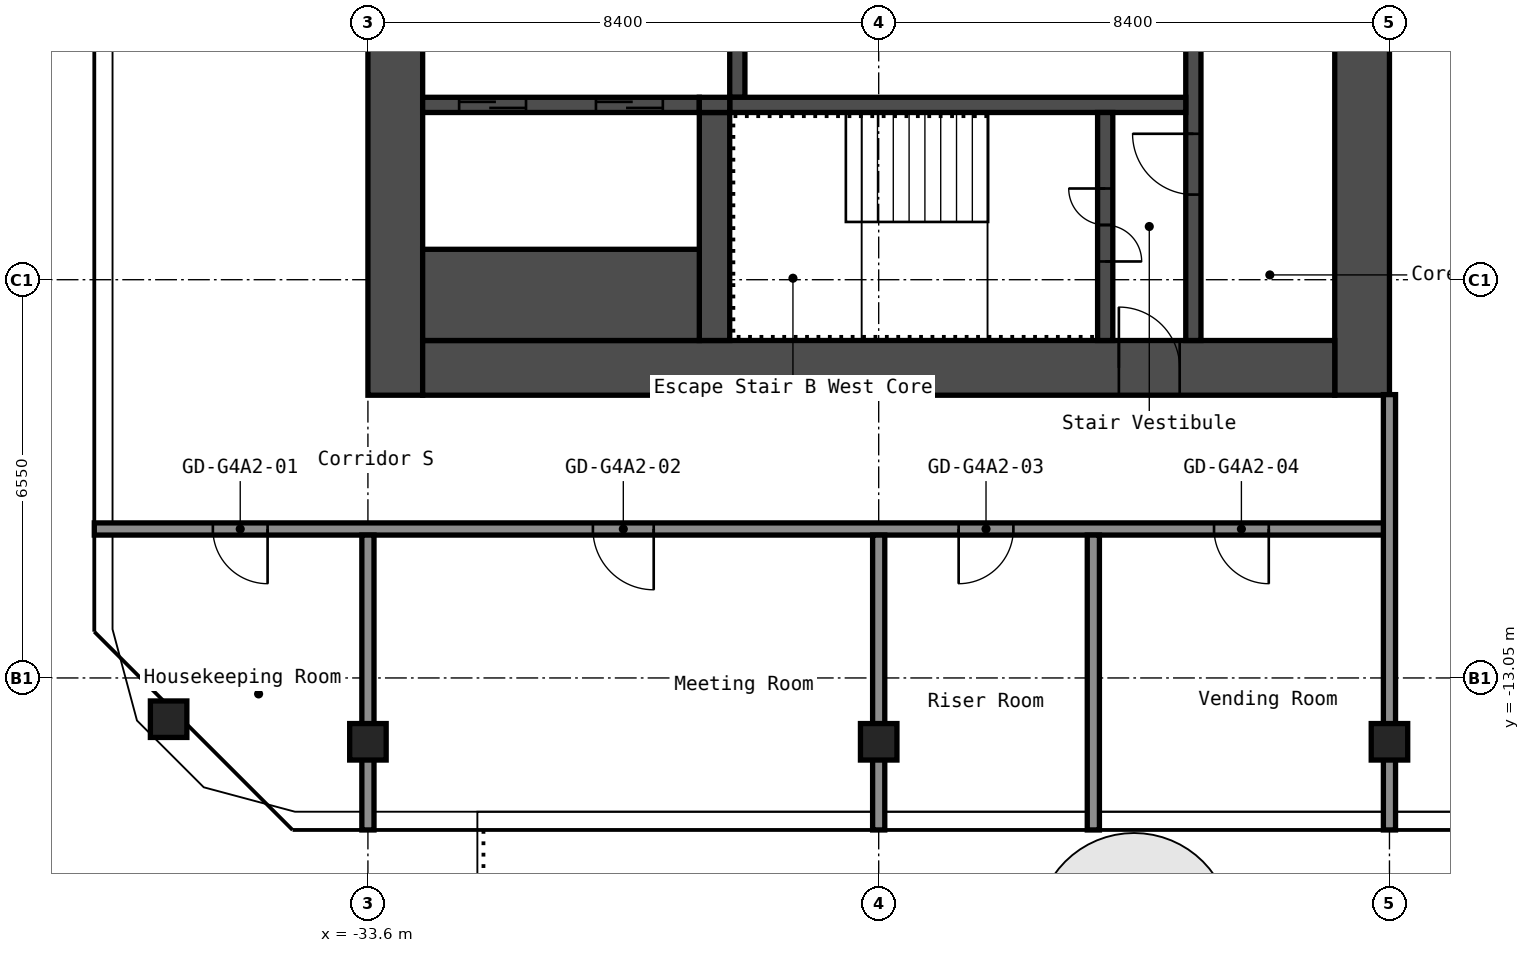
"""IFC4 building model, lengths in metres.
Left out: names, types, materials, properties, quantities, classifications, styles, units other than length and angle.
Written with IfcOpenShell. Run it as: python <this file> out.ifc"""

import sys

from ifc_helpers import new_model, si_unit, direction, frame, frame_2d, origin, origin_2d, place, context, subcontext, project, spatial, rectangle, hollow_rectangle, extrude, element, fill, save


model = new_model("IFC4")
c1 = context("Model", 3, precision=1e-05, world=origin(), true_north=direction((0.0, 1.0)))
c2 = subcontext(c1, "Body", "Model", "MODEL_VIEW")
j1 = project(units=[si_unit("LENGTHUNIT", "METRE"), si_unit("PLANEANGLEUNIT", "RADIAN")], contexts=[c1])
p1 = place(None, origin())
s1 = spatial("IfcSite", under=j1, at=p1, CompositionType="ELEMENT")
p2 = place(p1, origin())
s2 = spatial("IfcBuilding", under=s1, at=p2, CompositionType="ELEMENT")
p3 = place(p2, frame((0.0, 0.0, 218.6)))
s3 = spatial("IfcBuildingStorey", under=s2, at=p3, CompositionType="ELEMENT", Elevation=218.6)
for number, where, z_axis, x_axis in (
    (1, (-36.878, -13.729, 0.0), (0.0, 0.0, 1.0), (1.0, 0.0, 0.0)),
    (2, (-33.6, -14.1, 0.0), (0.0, 0.0, 1.0), (1.0, 0.0, 0.0)),
    (3, (-25.2, -14.1, 0.0), (0.0, 0.0, 1.0), (1.0, 0.0, 0.0)),
    (4, (-16.8, -14.1, 0.0), (0.0, 0.0, 1.0), (1.0, 0.0, 0.0)),
):
    element("IfcColumn", number, at=place(p3, frame(where, z_axis=z_axis, x_axis=x_axis)), inside=s3, PredefinedType="COLUMN", context=c2, shape_type="SweptSolid", body=[
        extrude(hollow_rectangle(XDim=0.6, YDim=0.6, WallThickness=0.025, InnerFilletRadius=0.038, OuterFilletRadius=0.062, at=origin_2d()), origin(), (0.0, 0.0, 1.0), 2.75),
    ])
p4 = place(p3, frame((-17.25, -8.4, 0.0), z_axis=(0.0, 0.0, 1.0), x_axis=(0.0, 1.0, 0.0)))
e5 = element("IfcWall", 5, at=p4, inside=s3, PredefinedType="SHEAR", context=c2, shape_type="SweptSolid", body=[
    extrude(rectangle(XDim=16.8, YDim=0.9, at=frame_2d((8.4, 0.0))), origin(), (0.0, 0.0, 1.0), 2.75),
])
p5 = place(p4, frame((10.1, 0.0, 0.0)))
e6 = element("IfcOpeningElement", 6, at=p5, cuts=e5, PredefinedType="OPENING", context=c2, shape_type="SweptSolid", body=[
    extrude(rectangle(XDim=1.6, YDim=2.1, at=frame_2d((0.8, 1.05))), frame((0.0, 0.46, 0.0), z_axis=(0.0, -1.0, 0.0), x_axis=(1.0, 0.0, 0.0)), (0.0, 0.0, 1.0), 0.92),
])
p6 = place(p3, frame((-33.15, -8.4, 0.0), z_axis=(0.0, 0.0, 1.0), x_axis=(0.0, 1.0, 0.0)))
e7 = element("IfcWall", 7, at=p6, inside=s3, PredefinedType="SHEAR", context=c2, shape_type="SweptSolid", body=[
    extrude(rectangle(XDim=16.8, YDim=0.9, at=frame_2d((8.4, 0.0))), origin(), (0.0, 0.0, 1.0), 2.75),
])
p7 = place(p3, frame((-32.7, -7.95, 0.0), z_axis=(0.0, 0.0, 1.0), x_axis=(1.0, 0.0, 0.0)))
e8 = element("IfcWall", 8, at=p7, inside=s3, PredefinedType="SHEAR", context=c2, shape_type="SweptSolid", body=[
    extrude(rectangle(XDim=15.0, YDim=0.9, at=frame_2d((7.5, 0.0))), origin(), (0.0, 0.0, 1.0), 2.75),
])
p8 = place(p7, frame((11.45, 0.0, 0.0)))
e9 = element("IfcOpeningElement", 9, at=p8, cuts=e8, PredefinedType="OPENING", context=c2, shape_type="SweptSolid", body=[
    extrude(rectangle(XDim=1.0, YDim=2.1, at=frame_2d((0.5, 1.05))), frame((0.0, 0.46, 0.0), z_axis=(0.0, -1.0, 0.0), x_axis=(1.0, 0.0, 0.0)), (0.0, 0.0, 1.0), 0.92),
])
p9 = place(p3, frame((-20.025, -7.5, 0.0), z_axis=(0.0, 0.0, 1.0), x_axis=(0.0, 1.0, 0.0)))
e10 = element("IfcWall", 10, at=p9, inside=s3, PredefinedType="SHEAR", context=c2, shape_type="SweptSolid", body=[
    extrude(rectangle(XDim=6.3, YDim=0.25, at=frame_2d((3.15, 0.0))), origin(), (0.0, 0.0, 1.0), 2.75),
])
p10 = place(p9, frame((2.4, 0.0, 0.0)))
e11 = element("IfcOpeningElement", 11, at=p10, cuts=e10, PredefinedType="OPENING", context=c2, shape_type="SweptSolid", body=[
    extrude(rectangle(XDim=1.0, YDim=2.1, at=frame_2d((0.5, 1.05))), frame((0.0, 0.135, 0.0), z_axis=(0.0, -1.0, 0.0), x_axis=(1.0, 0.0, 0.0)), (0.0, 0.0, 1.0), 0.27),
])
p11 = place(p3, frame((-27.525, -3.5, 0.0), z_axis=(0.0, 0.0, 1.0), x_axis=(0.0, 1.0, 0.0)))
e12 = element("IfcWall", 12, at=p11, inside=s3, PredefinedType="SHEAR", context=c2, shape_type="SweptSolid", body=[
    extrude(rectangle(XDim=2.05, YDim=0.25, at=frame_2d((1.025, 0.0))), origin(), (0.0, 0.0, 1.0), 2.75),
])
p12 = place(p3, frame((-27.65, -3.625, 0.0), z_axis=(0.0, 0.0, 1.0), x_axis=(1.0, 0.0, 0.0)))
e13 = element("IfcWall", 13, at=p12, inside=s3, PredefinedType="SHEAR", context=c2, shape_type="SweptSolid", body=[
    extrude(rectangle(XDim=7.5, YDim=0.25, at=frame_2d((3.75, 0.0))), origin(), (0.0, 0.0, 1.0), 2.75),
])
p13 = place(p3, frame((-21.475, -7.5, 0.0), z_axis=(0.0, 0.0, 1.0), x_axis=(0.0, 1.0, 0.0)))
e14 = element("IfcWall", 14, at=p13, inside=s3, PredefinedType="SHEAR", context=c2, shape_type="SweptSolid", body=[
    extrude(rectangle(XDim=3.75, YDim=0.25, at=frame_2d((1.875, 0.0))), origin(), (0.0, 0.0, 1.0), 2.75),
])
p14 = place(p13, frame((1.3, 0.0, 0.0)))
e15 = element("IfcOpeningElement", 15, at=p14, cuts=e14, PredefinedType="OPENING", context=c2, shape_type="SweptSolid", body=[
    extrude(rectangle(XDim=1.2, YDim=2.1, at=frame_2d((0.6, 1.05))), frame((0.0, 0.135, 0.0), z_axis=(0.0, -1.0, 0.0), x_axis=(1.0, 0.0, 0.0)), (0.0, 0.0, 1.0), 0.27),
])
p15 = place(p3, frame((-27.9, -7.5, 0.0), z_axis=(0.0, 0.0, 1.0), x_axis=(0.0, 1.0, 0.0)))
e16 = element("IfcWall", 16, at=p15, inside=s3, PredefinedType="SHEAR", context=c2, shape_type="SweptSolid", body=[
    extrude(rectangle(XDim=3.75, YDim=0.5, at=frame_2d((1.875, 0.0))), origin(), (0.0, 0.0, 1.0), 2.75),
])
p16 = place(p3, frame((-32.7, -3.625, 0.0), z_axis=(0.0, 0.0, 1.0), x_axis=(1.0, 0.0, 0.0)))
e17 = element("IfcWall", 17, at=p16, inside=s3, PredefinedType="SHEAR", context=c2, shape_type="SweptSolid", body=[
    extrude(rectangle(XDim=4.55, YDim=0.25, at=frame_2d((2.275, 0.0))), origin(), (0.0, 0.0, 1.0), 2.75),
])
p17 = place(p16, frame((2.85, 0.0, 0.0)))
e18 = element("IfcOpeningElement", 18, at=p17, cuts=e17, PredefinedType="OPENING", context=c2, shape_type="SweptSolid", body=[
    extrude(rectangle(XDim=1.1, YDim=2.1, at=frame_2d((0.55, 1.05))), frame((0.0, 0.135, 0.0), z_axis=(0.0, -1.0, 0.0), x_axis=(1.0, 0.0, 0.0)), (0.0, 0.0, 1.0), 0.27),
])
p18 = place(p16, frame((0.6, 0.0, 0.0)))
e19 = element("IfcOpeningElement", 19, at=p18, cuts=e17, PredefinedType="OPENING", context=c2, shape_type="SweptSolid", body=[
    extrude(rectangle(XDim=1.1, YDim=2.1, at=frame_2d((0.55, 1.05))), frame((0.0, 0.135, 0.0), z_axis=(0.0, -1.0, 0.0), x_axis=(1.0, 0.0, 0.0)), (0.0, 0.0, 1.0), 0.27),
])
p19 = place(p3, frame((-32.7, -6.75, 0.0), z_axis=(0.0, 0.0, 1.0), x_axis=(1.0, 0.0, 0.0)))
e20 = element("IfcWall", 20, at=p19, inside=s3, PredefinedType="SHEAR", context=c2, shape_type="SweptSolid", body=[
    extrude(rectangle(XDim=4.55, YDim=1.5, at=frame_2d((2.275, 0.0))), origin(), (0.0, 0.0, 1.0), 2.75),
])
p20 = place(p3, frame((-28.15, -3.625, 0.0), z_axis=(0.0, 0.0, 1.0), x_axis=(1.0, 0.0, 0.0)))
e21 = element("IfcWall", 21, at=p20, inside=s3, PredefinedType="SHEAR", context=c2, shape_type="SweptSolid", body=[
    extrude(rectangle(XDim=0.5, YDim=0.25, at=frame_2d((0.25, 0.0))), origin(), (0.0, 0.0, 1.0), 2.75),
])
p21 = place(p3, frame((-38.1, -10.6, 0.0), z_axis=(0.0, 0.0, 1.0), x_axis=(1.0, 0.0, 0.0)))
e22 = element("IfcWall", 22, at=p21, inside=s3, PredefinedType="PARTITIONING", context=c2, shape_type="SweptSolid", body=[
    extrude(rectangle(XDim=21.3, YDim=0.2, at=frame_2d((10.65, 0.0))), origin(), (0.0, 0.0, 1.0), 2.75),
])
p22 = place(p21, frame((1.95, 0.0, 0.0)))
e23 = element("IfcOpeningElement", 23, at=p22, cuts=e22, PredefinedType="OPENING", context=c2, shape_type="SweptSolid", body=[
    extrude(rectangle(XDim=0.9, YDim=2.1, at=frame_2d((0.45, 1.05))), frame((0.0, 0.11, 0.0), z_axis=(0.0, -1.0, 0.0), x_axis=(1.0, 0.0, 0.0)), (0.0, 0.0, 1.0), 0.22),
])
p23 = place(p21, frame((8.2, 0.0, 0.0)))
e24 = element("IfcOpeningElement", 24, at=p23, cuts=e22, PredefinedType="OPENING", context=c2, shape_type="SweptSolid", body=[
    extrude(rectangle(XDim=1.0, YDim=2.1, at=frame_2d((0.5, 1.05))), frame((0.0, 0.11, 0.0), z_axis=(0.0, -1.0, 0.0), x_axis=(1.0, 0.0, 0.0)), (0.0, 0.0, 1.0), 0.22),
])
p24 = place(p21, frame((14.215, 0.0, 0.0)))
e25 = element("IfcOpeningElement", 25, at=p24, cuts=e22, PredefinedType="OPENING", context=c2, shape_type="SweptSolid", body=[
    extrude(rectangle(XDim=0.9, YDim=2.1, at=frame_2d((0.45, 1.05))), frame((0.0, 0.11, 0.0), z_axis=(0.0, -1.0, 0.0), x_axis=(1.0, 0.0, 0.0)), (0.0, 0.0, 1.0), 0.22),
])
p25 = place(p21, frame((18.415, 0.0, 0.0)))
e26 = element("IfcOpeningElement", 26, at=p25, cuts=e22, PredefinedType="OPENING", context=c2, shape_type="SweptSolid", body=[
    extrude(rectangle(XDim=0.9, YDim=2.1, at=frame_2d((0.45, 1.05))), frame((0.0, 0.11, 0.0), z_axis=(0.0, -1.0, 0.0), x_axis=(1.0, 0.0, 0.0)), (0.0, 0.0, 1.0), 0.22),
])
for number, where, z_axis, x_axis in (
    (27, (-33.6, -15.55, 0.0), (0.0, 0.0, 1.0), (0.0, 1.0, 0.0)),
    (28, (-25.2, -15.55, 0.0), (0.0, 0.0, 1.0), (0.0, 1.0, 0.0)),
    (29, (-21.67, -15.55, 0.0), (0.0, 0.0, 1.0), (0.0, 1.0, 0.0)),
):
    element("IfcWall", number, at=place(p3, frame(where, z_axis=z_axis, x_axis=x_axis)), inside=s3, PredefinedType="PARTITIONING", context=c2, shape_type="SweptSolid", body=[
        extrude(rectangle(XDim=4.85, YDim=0.2, at=frame_2d((2.425, 0.0))), origin(), (0.0, 0.0, 1.0), 2.75),
    ])
p26 = place(p3, frame((-16.8, -15.55, 0.0), z_axis=(0.0, 0.0, 1.0), x_axis=(0.0, 1.0, 0.0)))
e30 = element("IfcWall", 30, at=p26, inside=s3, PredefinedType="PARTITIONING", context=c2, shape_type="SweptSolid", body=[
    extrude(rectangle(XDim=7.16, YDim=0.2, at=frame_2d((3.58, 0.0))), origin(), (0.0, 0.0, 1.0), 2.75),
])
p27 = place(p8, origin())
e31 = element("IfcDoor", 31, at=p27, inside=s3, OperationType="SINGLE_SWING_RIGHT", PredefinedType="DOOR", context=c2, shape_type="SweptSolid", body=[
    extrude(rectangle(XDim=1.0, YDim=2.1, at=frame_2d((0.5, 1.05))), frame((0.0, 0.025, 0.0), z_axis=(0.0, -1.0, 0.0), x_axis=(1.0, 0.0, 0.0)), (0.0, 0.0, 1.0), 0.05),
])
fill(e9, e31)
p28 = place(p14, origin())
e32 = element("IfcDoor", 32, at=p28, inside=s3, OperationType="DOUBLE_DOOR_SINGLE_SWING", PredefinedType="DOOR", context=c2, shape_type="SweptSolid", body=[
    extrude(rectangle(XDim=1.2, YDim=2.1, at=frame_2d((0.6, 1.05))), frame((0.0, 0.025, 0.0), z_axis=(0.0, -1.0, 0.0), x_axis=(1.0, 0.0, 0.0)), (0.0, 0.0, 1.0), 0.05),
])
fill(e15, e32)
p29 = place(p10, origin())
e33 = element("IfcDoor", 33, at=p29, inside=s3, OperationType="SINGLE_SWING_LEFT", PredefinedType="DOOR", context=c2, shape_type="SweptSolid", body=[
    extrude(rectangle(XDim=1.0, YDim=2.1, at=frame_2d((0.5, 1.05))), frame((0.0, 0.025, 0.0), z_axis=(0.0, -1.0, 0.0), x_axis=(1.0, 0.0, 0.0)), (0.0, 0.0, 1.0), 0.05),
])
fill(e11, e33)
p30 = place(p17, origin())
e34 = element("IfcDoor", 34, at=p30, inside=s3, OperationType="DOUBLE_DOOR_SLIDING", PredefinedType="DOOR", context=c2, shape_type="SweptSolid", body=[
    extrude(rectangle(XDim=1.1, YDim=2.1, at=frame_2d((0.55, 1.05))), frame((0.0, 0.025, 0.0), z_axis=(0.0, -1.0, 0.0), x_axis=(1.0, 0.0, 0.0)), (0.0, 0.0, 1.0), 0.05),
])
fill(e18, e34)
p31 = place(p18, origin())
e35 = element("IfcDoor", 35, at=p31, inside=s3, OperationType="DOUBLE_DOOR_SLIDING", PredefinedType="DOOR", context=c2, shape_type="SweptSolid", body=[
    extrude(rectangle(XDim=1.1, YDim=2.1, at=frame_2d((0.55, 1.05))), frame((0.0, 0.025, 0.0), z_axis=(0.0, -1.0, 0.0), x_axis=(1.0, 0.0, 0.0)), (0.0, 0.0, 1.0), 0.05),
])
fill(e19, e35)
p32 = place(p22, origin())
e36 = element("IfcDoor", 36, at=p32, inside=s3, OperationType="SINGLE_SWING_RIGHT", PredefinedType="DOOR", context=c2, shape_type="SweptSolid", body=[
    extrude(rectangle(XDim=0.9, YDim=2.1, at=frame_2d((0.45, 1.05))), frame((0.0, 0.025, 0.0), z_axis=(0.0, -1.0, 0.0), x_axis=(1.0, 0.0, 0.0)), (0.0, 0.0, 1.0), 0.05),
])
fill(e23, e36)
p33 = place(p23, origin())
e37 = element("IfcDoor", 37, at=p33, inside=s3, OperationType="SINGLE_SWING_RIGHT", PredefinedType="DOOR", context=c2, shape_type="SweptSolid", body=[
    extrude(rectangle(XDim=1.0, YDim=2.1, at=frame_2d((0.5, 1.05))), frame((0.0, 0.025, 0.0), z_axis=(0.0, -1.0, 0.0), x_axis=(1.0, 0.0, 0.0)), (0.0, 0.0, 1.0), 0.05),
])
fill(e24, e37)
p34 = place(p24, origin())
e38 = element("IfcDoor", 38, at=p34, inside=s3, OperationType="SINGLE_SWING_LEFT", PredefinedType="DOOR", context=c2, shape_type="SweptSolid", body=[
    extrude(rectangle(XDim=0.9, YDim=2.1, at=frame_2d((0.45, 1.05))), frame((0.0, 0.025, 0.0), z_axis=(0.0, -1.0, 0.0), x_axis=(1.0, 0.0, 0.0)), (0.0, 0.0, 1.0), 0.05),
])
fill(e25, e38)
p35 = place(p25, origin())
e39 = element("IfcDoor", 39, at=p35, inside=s3, OperationType="SINGLE_SWING_RIGHT", PredefinedType="DOOR", context=c2, shape_type="SweptSolid", body=[
    extrude(rectangle(XDim=0.9, YDim=2.1, at=frame_2d((0.45, 1.05))), frame((0.0, 0.025, 0.0), z_axis=(0.0, -1.0, 0.0), x_axis=(1.0, 0.0, 0.0)), (0.0, 0.0, 1.0), 0.05),
])
fill(e26, e39)
save(model, sys.argv[1])
